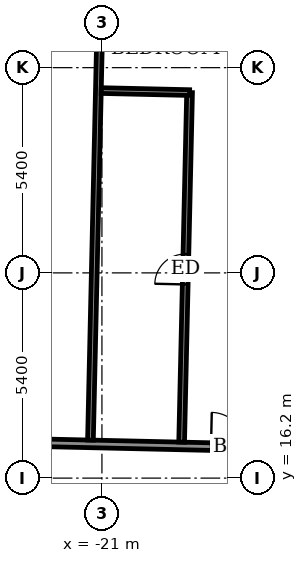
"""IFC4 building model, lengths in metres.
Left out: names, types, materials, properties, quantities, classifications, styles, units other than length and angle.
Written with IfcOpenShell. Run it as: python <this file> out.ifc"""

import sys

from ifc_helpers import new_model, si_unit, direction, frame, frame_2d, origin, place, context, subcontext, project, spatial, rectangle, extrude, element, fill, save


model = new_model("IFC4")
c1 = context("Model", 3, precision=1e-05, world=origin(), true_north=direction((0.0, 1.0)))
c2 = subcontext(c1, "Body", "Model", "MODEL_VIEW")
j1 = project(units=[si_unit("LENGTHUNIT", "METRE"), si_unit("PLANEANGLEUNIT", "RADIAN")], contexts=[c1])
p1 = place(None, origin())
s1 = spatial("IfcSite", under=j1, at=p1, CompositionType="ELEMENT")
p2 = place(p1, origin())
s2 = spatial("IfcBuilding", under=s1, at=p2, CompositionType="ELEMENT")
p3 = place(p2, frame((0.0, 0.0, 306.1)))
s3 = spatial("IfcBuildingStorey", under=s2, at=p3, CompositionType="ELEMENT", Elevation=306.1)
p4 = place(p3, frame((-30.652, 17.313, 0.0), z_axis=(0.0, 0.0, 1.0), x_axis=(0.999742623764, -0.02268669719, 0.0)))
e1 = element("IfcWall", 1, at=p4, inside=s3, PredefinedType="PARTITIONING", context=c2, shape_type="SweptSolid", body=[
    extrude(rectangle(XDim=58.8, YDim=0.2, at=frame_2d((29.4, 0.0))), origin(), (0.0, 0.0, 1.0), 3.05),
])
p5 = place(p4, frame((54.601, 0.0, 0.0)))
e2 = element("IfcOpeningElement", 2, at=p5, cuts=e1, PredefinedType="OPENING", context=c2, shape_type="SweptSolid", body=[
    extrude(rectangle(XDim=1.0, YDim=2.1, at=frame_2d((0.5, 1.05))), frame((0.0, 0.11, 0.0), z_axis=(0.0, -1.0, 0.0), x_axis=(1.0, 0.0, 0.0)), (0.0, 0.0, 1.0), 0.22),
])
p6 = place(p4, frame((49.35, 0.0, 0.0)))
e3 = element("IfcOpeningElement", 3, at=p6, cuts=e1, PredefinedType="OPENING", context=c2, shape_type="SweptSolid", body=[
    extrude(rectangle(XDim=0.9, YDim=2.1, at=frame_2d((0.45, 1.05))), frame((0.0, 0.11, 0.0), z_axis=(0.0, -1.0, 0.0), x_axis=(1.0, 0.0, 0.0)), (0.0, 0.0, 1.0), 0.22),
])
p7 = place(p4, frame((42.55, 0.0, 0.0)))
e4 = element("IfcOpeningElement", 4, at=p7, cuts=e1, PredefinedType="OPENING", context=c2, shape_type="SweptSolid", body=[
    extrude(rectangle(XDim=0.9, YDim=2.1, at=frame_2d((0.45, 1.05))), frame((0.0, 0.11, 0.0), z_axis=(0.0, -1.0, 0.0), x_axis=(1.0, 0.0, 0.0)), (0.0, 0.0, 1.0), 0.22),
])
p8 = place(p4, frame((40.475, 0.0, 0.0)))
e5 = element("IfcOpeningElement", 5, at=p8, cuts=e1, PredefinedType="OPENING", context=c2, shape_type="SweptSolid", body=[
    extrude(rectangle(XDim=0.9, YDim=2.1, at=frame_2d((0.45, 1.05))), frame((0.0, 0.11, 0.0), z_axis=(0.0, -1.0, 0.0), x_axis=(1.0, 0.0, 0.0)), (0.0, 0.0, 1.0), 0.22),
])
p9 = place(p4, frame((33.6, 0.0, 0.0)))
e6 = element("IfcOpeningElement", 6, at=p9, cuts=e1, PredefinedType="OPENING", context=c2, shape_type="SweptSolid", body=[
    extrude(rectangle(XDim=0.9, YDim=2.1, at=frame_2d((0.45, 1.05))), frame((0.0, 0.11, 0.0), z_axis=(0.0, -1.0, 0.0), x_axis=(1.0, 0.0, 0.0)), (0.0, 0.0, 1.0), 0.22),
])
p10 = place(p4, frame((31.55, 0.0, 0.0)))
e7 = element("IfcOpeningElement", 7, at=p10, cuts=e1, PredefinedType="OPENING", context=c2, shape_type="SweptSolid", body=[
    extrude(rectangle(XDim=0.9, YDim=2.1, at=frame_2d((0.45, 1.05))), frame((0.0, 0.11, 0.0), z_axis=(0.0, -1.0, 0.0), x_axis=(1.0, 0.0, 0.0)), (0.0, 0.0, 1.0), 0.22),
])
p11 = place(p4, frame((24.425, 0.0, 0.0)))
e8 = element("IfcOpeningElement", 8, at=p11, cuts=e1, PredefinedType="OPENING", context=c2, shape_type="SweptSolid", body=[
    extrude(rectangle(XDim=0.9, YDim=2.1, at=frame_2d((0.45, 1.05))), frame((0.0, 0.11, 0.0), z_axis=(0.0, -1.0, 0.0), x_axis=(1.0, 0.0, 0.0)), (0.0, 0.0, 1.0), 0.22),
])
p12 = place(p4, frame((22.05, 0.0, 0.0)))
e9 = element("IfcOpeningElement", 9, at=p12, cuts=e1, PredefinedType="OPENING", context=c2, shape_type="SweptSolid", body=[
    extrude(rectangle(XDim=0.9, YDim=2.1, at=frame_2d((0.45, 1.05))), frame((0.0, 0.11, 0.0), z_axis=(0.0, -1.0, 0.0), x_axis=(1.0, 0.0, 0.0)), (0.0, 0.0, 1.0), 0.22),
])
p13 = place(p4, frame((14.95, 0.0, 0.0)))
e10 = element("IfcOpeningElement", 10, at=p13, cuts=e1, PredefinedType="OPENING", context=c2, shape_type="SweptSolid", body=[
    extrude(rectangle(XDim=0.9, YDim=2.1, at=frame_2d((0.45, 1.05))), frame((0.0, 0.11, 0.0), z_axis=(0.0, -1.0, 0.0), x_axis=(1.0, 0.0, 0.0)), (0.0, 0.0, 1.0), 0.22),
])
p14 = place(p4, frame((12.525, 0.0, 0.0)))
e11 = element("IfcOpeningElement", 11, at=p14, cuts=e1, PredefinedType="OPENING", context=c2, shape_type="SweptSolid", body=[
    extrude(rectangle(XDim=0.9, YDim=2.1, at=frame_2d((0.45, 1.05))), frame((0.0, 0.11, 0.0), z_axis=(0.0, -1.0, 0.0), x_axis=(1.0, 0.0, 0.0)), (0.0, 0.0, 1.0), 0.22),
])
p15 = place(p4, frame((4.032, 0.0, 0.0)))
e12 = element("IfcOpeningElement", 12, at=p15, cuts=e1, PredefinedType="OPENING", context=c2, shape_type="SweptSolid", body=[
    extrude(rectangle(XDim=1.0, YDim=2.1, at=frame_2d((0.5, 1.05))), frame((0.0, 0.11, 0.0), z_axis=(0.0, -1.0, 0.0), x_axis=(1.0, 0.0, 0.0)), (0.0, 0.0, 1.0), 0.22),
])
p16 = place(p3, frame((-21.302, 17.201, 0.0), z_axis=(0.0, 0.0, 1.0), x_axis=(0.022637991173, 0.99974372784, 0.0)))
e13 = element("IfcWall", 13, at=p16, inside=s3, PredefinedType="PARTITIONING", context=c2, shape_type="SweptSolid", body=[
    extrude(rectangle(XDim=12.1, YDim=0.15, at=frame_2d((6.05, 0.0))), origin(), (0.0, 0.0, 1.0), 2.5),
])
p17 = place(p3, frame((-18.903, 17.147, 0.0), z_axis=(0.0, 0.0, 1.0), x_axis=(0.022717185456, 0.999741931443, 0.0)))
e14 = element("IfcWall", 14, at=p17, inside=s3, PredefinedType="PARTITIONING", context=c2, shape_type="SweptSolid", body=[
    extrude(rectangle(XDim=9.199, YDim=0.15, at=frame_2d((4.6, 0.0))), origin(), (0.0, 0.0, 1.0), 3.05),
])
p18 = place(p17, frame((4.15, 0.0, 0.0)))
e15 = element("IfcOpeningElement", 15, at=p18, cuts=e14, PredefinedType="OPENING", context=c2, shape_type="SweptSolid", body=[
    extrude(rectangle(XDim=0.8, YDim=2.1, at=frame_2d((0.4, 1.05))), frame((0.0, 0.085, 0.0), z_axis=(0.0, -1.0, 0.0), x_axis=(1.0, 0.0, 0.0)), (0.0, 0.0, 1.0), 0.17),
])
p19 = place(p3, frame((-21.019, 26.397, 0.0), z_axis=(0.0, 0.0, 1.0), x_axis=(0.999740478815, -0.022781023197, 0.0)))
e16 = element("IfcWall", 16, at=p19, inside=s3, PredefinedType="PARTITIONING", context=c2, shape_type="SweptSolid", body=[
    extrude(rectangle(XDim=2.325, YDim=0.15, at=frame_2d((1.163, 0.0))), origin(), (0.0, 0.0, 1.0), 3.05),
])
p20 = place(p14, origin())
e17 = element("IfcDoor", 17, at=p20, inside=s3, OperationType="SINGLE_SWING_LEFT", PredefinedType="DOOR", context=c2, shape_type="SweptSolid", body=[
    extrude(rectangle(XDim=0.9, YDim=2.1, at=frame_2d((0.45, 1.05))), frame((0.0, 0.025, 0.0), z_axis=(0.0, -1.0, 0.0), x_axis=(1.0, 0.0, 0.0)), (0.0, 0.0, 1.0), 0.05),
])
fill(e11, e17)
p21 = place(p18, origin())
e18 = element("IfcDoor", 18, at=p21, inside=s3, OperationType="SINGLE_SWING_LEFT", PredefinedType="DOOR", context=c2, shape_type="SweptSolid", body=[
    extrude(rectangle(XDim=0.8, YDim=2.1, at=frame_2d((0.4, 1.05))), frame((0.0, 0.025, 0.0), z_axis=(0.0, -1.0, 0.0), x_axis=(1.0, 0.0, 0.0)), (0.0, 0.0, 1.0), 0.05),
])
fill(e15, e18)
save(model, sys.argv[1])
